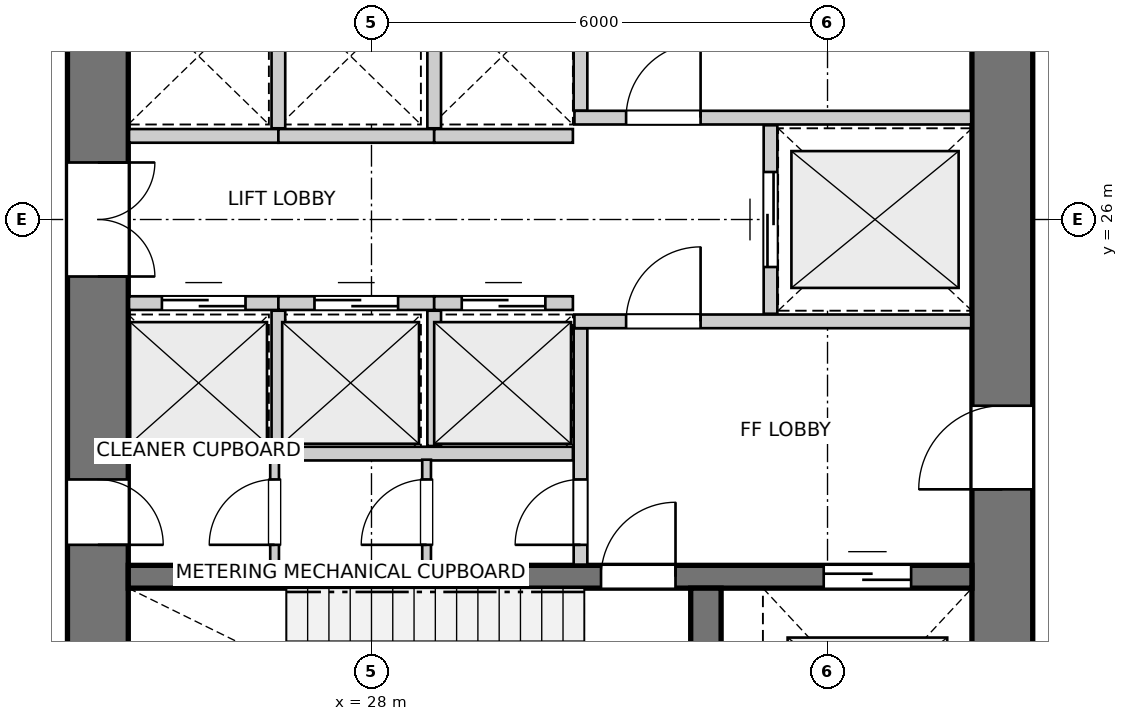
"""IFC4 building model, lengths in metres.
Left out: names, types, materials, properties, quantities, classifications, styles, units other than length and angle.
Written with IfcOpenShell. Run it as: python <this file> out.ifc"""

import sys

from ifc_helpers import new_model, si_unit, direction, frame, frame_2d, origin, place, context, subcontext, project, spatial, rectangle, extrude, source, transform, mapped, element, fill, save


model = new_model("IFC4")
c1 = context("Model", 3, precision=1e-05, world=origin(), true_north=direction((0.0, 1.0)))
c2 = subcontext(c1, "Body", "Model", "MODEL_VIEW")
j1 = project(units=[si_unit("LENGTHUNIT", "METRE"), si_unit("PLANEANGLEUNIT", "RADIAN")], contexts=[c1])
p1 = place(None, origin())
s1 = spatial("IfcSite", under=j1, at=p1, CompositionType="ELEMENT")
p2 = place(p1, origin())
s2 = spatial("IfcBuilding", under=s1, at=p2, CompositionType="ELEMENT")
p3 = place(p2, frame((0.0, 0.0, 65.4)))
s3 = spatial("IfcBuildingStorey", under=s2, at=p3, CompositionType="ELEMENT", Elevation=65.4)
p4 = place(p3, frame((24.4, 33.8, 0.0), z_axis=(0.0, 0.0, 1.0), x_axis=(0.0, -1.0, 0.0)))
e1 = element("IfcWall", 1, at=p4, inside=s3, PredefinedType="SHEAR", context=c2, shape_type="SweptSolid", body=[
    extrude(rectangle(XDim=15.6, YDim=0.8, at=frame_2d((7.8, 0.0))), origin(), (0.0, 0.0, 1.0), 4.75),
])
p5 = place(p4, frame((7.05, 0.0, 0.0)))
e2 = element("IfcOpeningElement", 2, at=p5, cuts=e1, PredefinedType="OPENING", context=c2, shape_type="SweptSolid", body=[
    extrude(rectangle(XDim=1.5, YDim=2.15, at=frame_2d((0.75, 1.075))), frame((0.0, 0.41, 0.0), z_axis=(0.0, -1.0, 0.0), x_axis=(1.0, 0.0, 0.0)), (0.0, 0.0, 1.0), 0.82),
])
p6 = place(p4, frame((3.52, 0.0, 0.0)))
e3 = element("IfcOpeningElement", 3, at=p6, cuts=e1, PredefinedType="OPENING", context=c2, shape_type="SweptSolid", body=[
    extrude(rectangle(XDim=0.86, YDim=2.05, at=frame_2d((0.43, 1.025))), frame((0.0, 0.41, 0.0), z_axis=(0.0, -1.0, 0.0), x_axis=(1.0, 0.0, 0.0)), (0.0, 0.0, 1.0), 0.82),
])
p7 = place(p4, frame((11.22, 0.0, 0.0)))
e4 = element("IfcOpeningElement", 4, at=p7, cuts=e1, PredefinedType="OPENING", context=c2, shape_type="SweptSolid", body=[
    extrude(rectangle(XDim=0.86, YDim=2.05, at=frame_2d((0.43, 1.025))), frame((0.0, 0.41, 0.0), z_axis=(0.0, -1.0, 0.0), x_axis=(1.0, 0.0, 0.0)), (0.0, 0.0, 1.0), 0.82),
])
p8 = place(p3, frame((36.3, 18.2, 0.0), z_axis=(0.0, 0.0, 1.0), x_axis=(0.0, 1.0, 0.0)))
e5 = element("IfcWall", 5, at=p8, inside=s3, PredefinedType="SHEAR", context=c2, shape_type="SweptSolid", body=[
    extrude(rectangle(XDim=15.6, YDim=0.8, at=frame_2d((7.8, 0.0))), origin(), (0.0, 0.0, 1.0), 4.75),
])
p9 = place(p8, frame((4.25, 0.0, 0.0)))
e6 = element("IfcOpeningElement", 6, at=p9, cuts=e5, PredefinedType="OPENING", context=c2, shape_type="SweptSolid", body=[
    extrude(rectangle(XDim=1.1, YDim=2.15, at=frame_2d((0.55, 1.075))), frame((0.0, 0.41, 0.0), z_axis=(0.0, -1.0, 0.0), x_axis=(1.0, 0.0, 0.0)), (0.0, 0.0, 1.0), 0.82),
])
p10 = place(p8, frame((10.25, 0.0, 0.0)))
e7 = element("IfcOpeningElement", 7, at=p10, cuts=e5, PredefinedType="OPENING", context=c2, shape_type="SweptSolid", body=[
    extrude(rectangle(XDim=1.1, YDim=2.15, at=frame_2d((0.55, 1.075))), frame((0.0, 0.41, 0.0), z_axis=(0.0, -1.0, 0.0), x_axis=(1.0, 0.0, 0.0)), (0.0, 0.0, 1.0), 0.82),
])
p11 = place(p3, frame((24.8, 21.3, 0.0), z_axis=(0.0, 0.0, 1.0), x_axis=(1.0, 0.0, 0.0)))
e8 = element("IfcWall", 8, at=p11, inside=s3, PredefinedType="SHEAR", context=c2, shape_type="SweptSolid", body=[
    extrude(rectangle(XDim=11.1, YDim=0.3, at=frame_2d((5.55, 0.0))), origin(), (0.0, 0.0, 1.0), 4.75),
])
p12 = place(p11, frame((6.22, 0.0, 0.0)))
e9 = element("IfcOpeningElement", 9, at=p12, cuts=e8, PredefinedType="OPENING", context=c2, shape_type="SweptSolid", body=[
    extrude(rectangle(XDim=0.98, YDim=2.15, at=frame_2d((0.49, 1.075))), frame((0.0, 0.16, 0.0), z_axis=(0.0, -1.0, 0.0), x_axis=(1.0, 0.0, 0.0)), (0.0, 0.0, 1.0), 0.32),
])
p13 = place(p11, frame((9.15, 0.0, 0.0)))
e10 = element("IfcOpeningElement", 10, at=p13, cuts=e8, PredefinedType="OPENING", context=c2, shape_type="SweptSolid", body=[
    extrude(rectangle(XDim=1.15, YDim=2.15, at=frame_2d((0.575, 1.075))), frame((0.0, 0.16, 0.0), z_axis=(0.0, -1.0, 0.0), x_axis=(1.0, 0.0, 0.0)), (0.0, 0.0, 1.0), 0.32),
])
p14 = place(p3, frame((32.4, 18.2, 0.0), z_axis=(0.0, 0.0, 1.0), x_axis=(0.0, 1.0, 0.0)))
e11 = element("IfcWall", 11, at=p14, inside=s3, PredefinedType="SHEAR", context=c2, shape_type="SweptSolid", body=[
    extrude(rectangle(XDim=2.95, YDim=0.4, at=frame_2d((1.475, 0.0))), origin(), (0.0, 0.0, 1.0), 4.75),
])
p15 = place(p3, frame((30.75, 21.46, 0.0), z_axis=(0.0, 0.0, 1.0), x_axis=(0.0, 1.0, 0.0)))
e12 = element("IfcWall", 12, at=p15, inside=s3, PredefinedType="PARTITIONING", context=c2, shape_type="SweptSolid", body=[
    extrude(rectangle(XDim=3.11, YDim=0.18, at=frame_2d((1.555, 0.0))), origin(), (0.0, 0.0, 1.0), 4.75),
])
p16 = place(p15, frame((0.26, 0.0, 0.0)))
e13 = element("IfcOpeningElement", 13, at=p16, cuts=e12, PredefinedType="OPENING", context=c2, shape_type="SweptSolid", body=[
    extrude(rectangle(XDim=0.86, YDim=2.05, at=frame_2d((0.43, 1.025))), frame((0.0, 0.1, 0.0), z_axis=(0.0, -1.0, 0.0), x_axis=(1.0, 0.0, 0.0)), (0.0, 0.0, 1.0), 0.2),
])
p17 = place(p3, frame((30.67, 24.66, 0.0), z_axis=(0.0, 0.0, 1.0), x_axis=(1.0, 0.0, 0.0)))
e14 = element("IfcWall", 14, at=p17, inside=s3, PredefinedType="PARTITIONING", context=c2, shape_type="SweptSolid", body=[
    extrude(rectangle(XDim=5.22, YDim=0.18, at=frame_2d((2.61, 0.0))), origin(), (0.0, 0.0, 1.0), 4.75),
])
p18 = place(p17, frame((0.68, 0.0, 0.0)))
e15 = element("IfcOpeningElement", 15, at=p18, cuts=e14, PredefinedType="OPENING", context=c2, shape_type="SweptSolid", body=[
    extrude(rectangle(XDim=0.98, YDim=2.15, at=frame_2d((0.49, 1.075))), frame((0.0, 0.1, 0.0), z_axis=(0.0, -1.0, 0.0), x_axis=(1.0, 0.0, 0.0)), (0.0, 0.0, 1.0), 0.2),
])
p19 = place(p3, frame((30.75, 27.43, 0.0), z_axis=(0.0, 0.0, 1.0), x_axis=(0.0, 1.0, 0.0)))
e16 = element("IfcWall", 16, at=p19, inside=s3, PredefinedType="PARTITIONING", context=c2, shape_type="SweptSolid", body=[
    extrude(rectangle(XDim=3.11, YDim=0.18, at=frame_2d((1.555, 0.0))), origin(), (0.0, 0.0, 1.0), 4.75),
])
p20 = place(p19, frame((1.98, 0.0, 0.0)))
e17 = element("IfcOpeningElement", 17, at=p20, cuts=e16, PredefinedType="OPENING", context=c2, shape_type="SweptSolid", body=[
    extrude(rectangle(XDim=0.86, YDim=2.05, at=frame_2d((0.43, 1.025))), frame((0.0, 0.1, 0.0), z_axis=(0.0, -1.0, 0.0), x_axis=(1.0, 0.0, 0.0)), (0.0, 0.0, 1.0), 0.2),
])
p21 = place(p3, frame((30.67, 27.34, 0.0), z_axis=(0.0, 0.0, 1.0), x_axis=(1.0, 0.0, 0.0)))
e18 = element("IfcWall", 18, at=p21, inside=s3, PredefinedType="PARTITIONING", context=c2, shape_type="SweptSolid", body=[
    extrude(rectangle(XDim=5.22, YDim=0.18, at=frame_2d((2.61, 0.0))), origin(), (0.0, 0.0, 1.0), 4.75),
])
p22 = place(p21, frame((0.68, 0.0, 0.0)))
e19 = element("IfcOpeningElement", 19, at=p22, cuts=e18, PredefinedType="OPENING", context=c2, shape_type="SweptSolid", body=[
    extrude(rectangle(XDim=0.98, YDim=2.15, at=frame_2d((0.49, 1.075))), frame((0.0, 0.1, 0.0), z_axis=(0.0, -1.0, 0.0), x_axis=(1.0, 0.0, 0.0)), (0.0, 0.0, 1.0), 0.2),
])
p23 = place(p3, frame((33.25, 24.76, 0.0), z_axis=(0.0, 0.0, 1.0), x_axis=(0.0, 1.0, 0.0)))
e20 = element("IfcWall", 20, at=p23, inside=s3, PredefinedType="PARTITIONING", context=c2, shape_type="SweptSolid", body=[
    extrude(rectangle(XDim=2.48, YDim=0.18, at=frame_2d((1.24, 0.0))), origin(), (0.0, 0.0, 1.0), 4.75),
])
p24 = place(p23, frame((0.615, 0.0, 0.0)))
e21 = element("IfcOpeningElement", 21, at=p24, cuts=e20, PredefinedType="OPENING", context=c2, shape_type="SweptSolid", body=[
    extrude(rectangle(XDim=1.25, YDim=2.15, at=frame_2d((0.625, 1.075))), frame((0.0, 0.1, 0.0), z_axis=(0.0, -1.0, 0.0), x_axis=(1.0, 0.0, 0.0)), (0.0, 0.0, 1.0), 0.2),
])
p25 = place(p3, frame((24.81, 22.92, 0.0), z_axis=(0.0, 0.0, 1.0), x_axis=(1.0, 0.0, 0.0)))
e22 = element("IfcWall", 22, at=p25, inside=s3, PredefinedType="PARTITIONING", context=c2, shape_type="SweptSolid", body=[
    extrude(rectangle(XDim=5.84, YDim=0.18, at=frame_2d((2.92, 0.0))), origin(), (0.0, 0.0, 1.0), 4.75),
])
p26 = place(p3, frame((24.81, 24.9, 0.0), z_axis=(0.0, 0.0, 1.0), x_axis=(1.0, 0.0, 0.0)))
e23 = element("IfcWall", 23, at=p26, inside=s3, PredefinedType="PARTITIONING", context=c2, shape_type="SweptSolid", body=[
    extrude(rectangle(XDim=1.965, YDim=0.18, at=frame_2d((0.982, 0.0))), origin(), (0.0, 0.0, 1.0), 4.75),
])
p27 = place(p26, frame((0.433, 0.0, 0.0)))
e24 = element("IfcOpeningElement", 24, at=p27, cuts=e23, PredefinedType="OPENING", context=c2, shape_type="SweptSolid", body=[
    extrude(rectangle(XDim=1.1, YDim=2.15, at=frame_2d((0.55, 1.075))), frame((0.0, 0.1, 0.0), z_axis=(0.0, -1.0, 0.0), x_axis=(1.0, 0.0, 0.0)), (0.0, 0.0, 1.0), 0.2),
])
p28 = place(p3, frame((26.775, 24.9, 0.0), z_axis=(0.0, 0.0, 1.0), x_axis=(1.0, 0.0, 0.0)))
e25 = element("IfcWall", 25, at=p28, inside=s3, PredefinedType="PARTITIONING", context=c2, shape_type="SweptSolid", body=[
    extrude(rectangle(XDim=2.05, YDim=0.18, at=frame_2d((1.025, 0.0))), origin(), (0.0, 0.0, 1.0), 4.75),
])
p29 = place(p28, frame((0.475, 0.0, 0.0)))
e26 = element("IfcOpeningElement", 26, at=p29, cuts=e25, PredefinedType="OPENING", context=c2, shape_type="SweptSolid", body=[
    extrude(rectangle(XDim=1.1, YDim=2.15, at=frame_2d((0.55, 1.075))), frame((0.0, 0.1, 0.0), z_axis=(0.0, -1.0, 0.0), x_axis=(1.0, 0.0, 0.0)), (0.0, 0.0, 1.0), 0.2),
])
p30 = place(p3, frame((26.775, 23.02, 0.0), z_axis=(0.0, 0.0, 1.0), x_axis=(0.0, 1.0, 0.0)))
e27 = element("IfcWall", 27, at=p30, inside=s3, PredefinedType="PARTITIONING", context=c2, shape_type="SweptSolid", body=[
    extrude(rectangle(XDim=1.78, YDim=0.18, at=frame_2d((0.89, 0.0))), origin(), (0.0, 0.0, 1.0), 4.75),
])
p31 = place(p3, frame((28.825, 24.9, 0.0), z_axis=(0.0, 0.0, 1.0), x_axis=(1.0, 0.0, 0.0)))
e28 = element("IfcWall", 28, at=p31, inside=s3, PredefinedType="PARTITIONING", context=c2, shape_type="SweptSolid", body=[
    extrude(rectangle(XDim=1.825, YDim=0.18, at=frame_2d((0.913, 0.0))), origin(), (0.0, 0.0, 1.0), 4.75),
])
p32 = place(p31, frame((0.363, 0.0, 0.0)))
e29 = element("IfcOpeningElement", 29, at=p32, cuts=e28, PredefinedType="OPENING", context=c2, shape_type="SweptSolid", body=[
    extrude(rectangle(XDim=1.1, YDim=2.15, at=frame_2d((0.55, 1.075))), frame((0.0, 0.1, 0.0), z_axis=(0.0, -1.0, 0.0), x_axis=(1.0, 0.0, 0.0)), (0.0, 0.0, 1.0), 0.2),
])
p33 = place(p3, frame((28.825, 23.02, 0.0), z_axis=(0.0, 0.0, 1.0), x_axis=(0.0, 1.0, 0.0)))
e30 = element("IfcWall", 30, at=p33, inside=s3, PredefinedType="PARTITIONING", context=c2, shape_type="SweptSolid", body=[
    extrude(rectangle(XDim=1.78, YDim=0.18, at=frame_2d((0.89, 0.0))), origin(), (0.0, 0.0, 1.0), 4.75),
])
p34 = place(p3, frame((24.81, 27.1, 0.0), z_axis=(0.0, 0.0, 1.0), x_axis=(1.0, 0.0, 0.0)))
e31 = element("IfcWall", 31, at=p34, inside=s3, PredefinedType="PARTITIONING", context=c2, shape_type="SweptSolid", body=[
    extrude(rectangle(XDim=1.965, YDim=0.18, at=frame_2d((0.982, 0.0))), origin(), (0.0, 0.0, 1.0), 4.75),
])
p35 = place(p3, frame((26.775, 27.1, 0.0), z_axis=(0.0, 0.0, 1.0), x_axis=(1.0, 0.0, 0.0)))
e32 = element("IfcWall", 32, at=p35, inside=s3, PredefinedType="PARTITIONING", context=c2, shape_type="SweptSolid", body=[
    extrude(rectangle(XDim=2.05, YDim=0.18, at=frame_2d((1.025, 0.0))), origin(), (0.0, 0.0, 1.0), 4.75),
])
p36 = place(p3, frame((26.775, 27.2, 0.0), z_axis=(0.0, 0.0, 1.0), x_axis=(0.0, 1.0, 0.0)))
e33 = element("IfcWall", 33, at=p36, inside=s3, PredefinedType="PARTITIONING", context=c2, shape_type="SweptSolid", body=[
    extrude(rectangle(XDim=1.78, YDim=0.18, at=frame_2d((0.89, 0.0))), origin(), (0.0, 0.0, 1.0), 4.75),
])
p37 = place(p3, frame((28.825, 27.1, 0.0), z_axis=(0.0, 0.0, 1.0), x_axis=(1.0, 0.0, 0.0)))
e34 = element("IfcWall", 34, at=p37, inside=s3, PredefinedType="PARTITIONING", context=c2, shape_type="SweptSolid", body=[
    extrude(rectangle(XDim=1.825, YDim=0.18, at=frame_2d((0.913, 0.0))), origin(), (0.0, 0.0, 1.0), 4.75),
])
p38 = place(p3, frame((28.825, 27.2, 0.0), z_axis=(0.0, 0.0, 1.0), x_axis=(0.0, 1.0, 0.0)))
e35 = element("IfcWall", 35, at=p38, inside=s3, PredefinedType="PARTITIONING", context=c2, shape_type="SweptSolid", body=[
    extrude(rectangle(XDim=1.78, YDim=0.18, at=frame_2d((0.89, 0.0))), origin(), (0.0, 0.0, 1.0), 4.75),
])
p39 = place(p3, frame((26.725, 21.46, 0.0), z_axis=(0.0, 0.0, 1.0), x_axis=(0.0, 1.0, 0.0)))
e36 = element("IfcWall", 36, at=p39, inside=s3, PredefinedType="PARTITIONING", context=c2, shape_type="SweptSolid", body=[
    extrude(rectangle(XDim=1.38, YDim=0.115, at=frame_2d((0.69, 0.0))), origin(), (0.0, 0.0, 1.0), 4.75),
])
p40 = place(p39, frame((0.26, 0.0, 0.0)))
e37 = element("IfcOpeningElement", 37, at=p40, cuts=e36, PredefinedType="OPENING", context=c2, shape_type="SweptSolid", body=[
    extrude(rectangle(XDim=0.86, YDim=2.05, at=frame_2d((0.43, 1.025))), frame((0.0, 0.067, 0.0), z_axis=(0.0, -1.0, 0.0), x_axis=(1.0, 0.0, 0.0)), (0.0, 0.0, 1.0), 0.135),
])
p41 = place(p3, frame((28.725, 21.46, 0.0), z_axis=(0.0, 0.0, 1.0), x_axis=(0.0, 1.0, 0.0)))
e38 = element("IfcWall", 38, at=p41, inside=s3, PredefinedType="PARTITIONING", context=c2, shape_type="SweptSolid", body=[
    extrude(rectangle(XDim=1.38, YDim=0.115, at=frame_2d((0.69, 0.0))), origin(), (0.0, 0.0, 1.0), 4.75),
])
p42 = place(p41, frame((0.26, 0.0, 0.0)))
e39 = element("IfcOpeningElement", 39, at=p42, cuts=e38, PredefinedType="OPENING", context=c2, shape_type="SweptSolid", body=[
    extrude(rectangle(XDim=0.86, YDim=2.05, at=frame_2d((0.43, 1.025))), frame((0.0, 0.067, 0.0), z_axis=(0.0, -1.0, 0.0), x_axis=(1.0, 0.0, 0.0)), (0.0, 0.0, 1.0), 0.135),
])
m1 = source(origin(), c2, "Body", "SweptSolid", [
    extrude(rectangle(XDim=0.98, YDim=2.15, at=frame_2d((0.49, 1.075))), frame((0.0, 0.025, 0.0), z_axis=(0.0, -1.0, 0.0), x_axis=(1.0, 0.0, 0.0)), (0.0, 0.0, 1.0), 0.05),
])
p43 = place(p12, origin())
e40 = element("IfcDoor", 40, at=p43, inside=s3, OperationType="SINGLE_SWING_RIGHT", PredefinedType="DOOR", context=c2, shape_type="MappedRepresentation", body=[
    mapped(m1, transform((0.0, 0.0, 0.0), x_axis=(1.0, 0.0, 0.0), y_axis=(0.0, 1.0, 0.0), z_axis=(0.0, 0.0, 1.0), scale=1.0)),
])
fill(e9, e40)
m2 = source(origin(), c2, "Body", "SweptSolid", [
    extrude(rectangle(XDim=1.15, YDim=2.15, at=frame_2d((0.575, 1.075))), frame((0.0, 0.025, 0.0), z_axis=(0.0, -1.0, 0.0), x_axis=(1.0, 0.0, 0.0)), (0.0, 0.0, 1.0), 0.05),
])
p44 = place(p13, origin())
e41 = element("IfcDoor", 41, at=p44, inside=s3, OperationType="DOUBLE_DOOR_SLIDING", PredefinedType="DOOR", context=c2, shape_type="MappedRepresentation", body=[
    mapped(m2, transform((0.0, 0.0, 0.0), x_axis=(1.0, 0.0, 0.0), y_axis=(0.0, 1.0, 0.0), z_axis=(0.0, 0.0, 1.0), scale=1.0)),
])
fill(e10, e41)
m3 = source(origin(), c2, "Body", "SweptSolid", [
    extrude(rectangle(XDim=1.1, YDim=2.15, at=frame_2d((0.55, 1.075))), frame((0.0, 0.025, 0.0), z_axis=(0.0, -1.0, 0.0), x_axis=(1.0, 0.0, 0.0)), (0.0, 0.0, 1.0), 0.05),
])
p45 = place(p9, origin())
e42 = element("IfcDoor", 42, at=p45, inside=s3, OperationType="SINGLE_SWING_LEFT", PredefinedType="DOOR", context=c2, shape_type="MappedRepresentation", body=[
    mapped(m3, transform((0.0, 0.0, 0.0), x_axis=(1.0, 0.0, 0.0), y_axis=(0.0, 1.0, 0.0), z_axis=(0.0, 0.0, 1.0), scale=1.0)),
])
fill(e6, e42)
m4 = source(origin(), c2, "Body", "SweptSolid", [
    extrude(rectangle(XDim=1.5, YDim=2.15, at=frame_2d((0.75, 1.075))), frame((0.0, 0.025, 0.0), z_axis=(0.0, -1.0, 0.0), x_axis=(1.0, 0.0, 0.0)), (0.0, 0.0, 1.0), 0.05),
])
p46 = place(p5, origin())
e43 = element("IfcDoor", 43, at=p46, inside=s3, OperationType="DOUBLE_DOOR_SINGLE_SWING", PredefinedType="DOOR", context=c2, shape_type="MappedRepresentation", body=[
    mapped(m4, transform((0.0, 0.0, 0.0), x_axis=(1.0, 0.0, 0.0), y_axis=(0.0, 1.0, 0.0), z_axis=(0.0, 0.0, 1.0), scale=1.0)),
])
fill(e2, e43)
m5 = source(origin(), c2, "Body", "SweptSolid", [
    extrude(rectangle(XDim=0.86, YDim=2.05, at=frame_2d((0.43, 1.025))), frame((0.0, 0.025, 0.0), z_axis=(0.0, -1.0, 0.0), x_axis=(1.0, 0.0, 0.0)), (0.0, 0.0, 1.0), 0.05),
])
p47 = place(p7, origin())
e44 = element("IfcDoor", 44, at=p47, inside=s3, OperationType="SINGLE_SWING_RIGHT", PredefinedType="DOOR", context=c2, shape_type="MappedRepresentation", body=[
    mapped(m5, transform((0.0, 0.0, 0.0), x_axis=(1.0, 0.0, 0.0), y_axis=(0.0, 1.0, 0.0), z_axis=(0.0, 0.0, 1.0), scale=1.0)),
])
fill(e4, e44)
p48 = place(p16, origin())
e45 = element("IfcDoor", 45, at=p48, inside=s3, OperationType="SINGLE_SWING_LEFT", PredefinedType="DOOR", context=c2, shape_type="MappedRepresentation", body=[
    mapped(m5, transform((0.0, 0.0, 0.0), x_axis=(1.0, 0.0, 0.0), y_axis=(0.0, 1.0, 0.0), z_axis=(0.0, 0.0, 1.0), scale=1.0)),
])
fill(e13, e45)
p49 = place(p18, origin())
e46 = element("IfcDoor", 46, at=p49, inside=s3, OperationType="SINGLE_SWING_RIGHT", PredefinedType="DOOR", context=c2, shape_type="MappedRepresentation", body=[
    mapped(m1, transform((0.0, 0.0, 0.0), x_axis=(1.0, 0.0, 0.0), y_axis=(0.0, 1.0, 0.0), z_axis=(0.0, 0.0, 1.0), scale=1.0)),
])
fill(e15, e46)
p50 = place(p22, origin())
e47 = element("IfcDoor", 47, at=p50, inside=s3, OperationType="SINGLE_SWING_RIGHT", PredefinedType="DOOR", context=c2, shape_type="MappedRepresentation", body=[
    mapped(m1, transform((0.0, 0.0, 0.0), x_axis=(1.0, 0.0, 0.0), y_axis=(0.0, 1.0, 0.0), z_axis=(0.0, 0.0, 1.0), scale=1.0)),
])
fill(e19, e47)
m6 = source(origin(), c2, "Body", "SweptSolid", [
    extrude(rectangle(XDim=1.25, YDim=2.15, at=frame_2d((0.625, 1.075))), frame((0.0, 0.025, 0.0), z_axis=(0.0, -1.0, 0.0), x_axis=(1.0, 0.0, 0.0)), (0.0, 0.0, 1.0), 0.05),
])
p51 = place(p24, origin())
e48 = element("IfcDoor", 48, at=p51, inside=s3, OperationType="DOUBLE_DOOR_SLIDING", PredefinedType="DOOR", context=c2, shape_type="MappedRepresentation", body=[
    mapped(m6, transform((0.0, 0.0, 0.0), x_axis=(1.0, 0.0, 0.0), y_axis=(0.0, 1.0, 0.0), z_axis=(0.0, 0.0, 1.0), scale=1.0)),
])
fill(e21, e48)
p52 = place(p27, origin())
e49 = element("IfcDoor", 49, at=p52, inside=s3, OperationType="DOUBLE_DOOR_SLIDING", PredefinedType="DOOR", context=c2, shape_type="MappedRepresentation", body=[
    mapped(m3, transform((0.0, 0.0, 0.0), x_axis=(1.0, 0.0, 0.0), y_axis=(0.0, 1.0, 0.0), z_axis=(0.0, 0.0, 1.0), scale=1.0)),
])
fill(e24, e49)
p53 = place(p29, origin())
e50 = element("IfcDoor", 50, at=p53, inside=s3, OperationType="DOUBLE_DOOR_SLIDING", PredefinedType="DOOR", context=c2, shape_type="MappedRepresentation", body=[
    mapped(m3, transform((0.0, 0.0, 0.0), x_axis=(1.0, 0.0, 0.0), y_axis=(0.0, 1.0, 0.0), z_axis=(0.0, 0.0, 1.0), scale=1.0)),
])
fill(e26, e50)
p54 = place(p32, origin())
e51 = element("IfcDoor", 51, at=p54, inside=s3, OperationType="DOUBLE_DOOR_SLIDING", PredefinedType="DOOR", context=c2, shape_type="MappedRepresentation", body=[
    mapped(m3, transform((0.0, 0.0, 0.0), x_axis=(1.0, 0.0, 0.0), y_axis=(0.0, 1.0, 0.0), z_axis=(0.0, 0.0, 1.0), scale=1.0)),
])
fill(e29, e51)
p55 = place(p40, origin())
e52 = element("IfcDoor", 52, at=p55, inside=s3, OperationType="SINGLE_SWING_LEFT", PredefinedType="DOOR", context=c2, shape_type="MappedRepresentation", body=[
    mapped(m5, transform((0.0, 0.0, 0.0), x_axis=(1.0, 0.0, 0.0), y_axis=(0.0, 1.0, 0.0), z_axis=(0.0, 0.0, 1.0), scale=1.0)),
])
fill(e37, e52)
p56 = place(p42, origin())
e53 = element("IfcDoor", 53, at=p56, inside=s3, OperationType="SINGLE_SWING_LEFT", PredefinedType="DOOR", context=c2, shape_type="MappedRepresentation", body=[
    mapped(m5, transform((0.0, 0.0, 0.0), x_axis=(1.0, 0.0, 0.0), y_axis=(0.0, 1.0, 0.0), z_axis=(0.0, 0.0, 1.0), scale=1.0)),
])
fill(e39, e53)
save(model, sys.argv[1])
